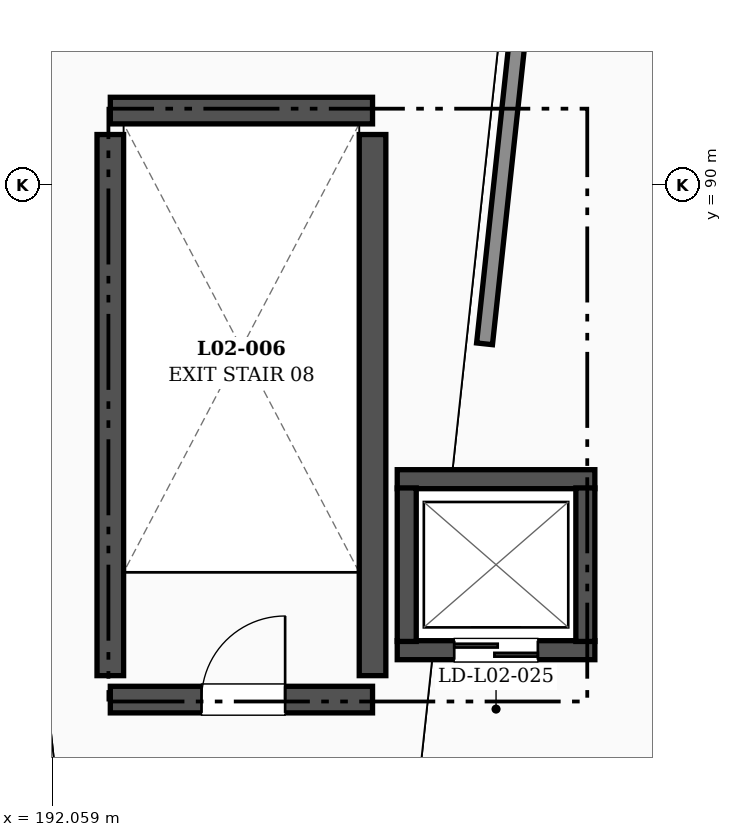
"""IFC4 building model, lengths in metres.
Left out: names, types, materials, properties, quantities, classifications, styles, units other than length and angle.
Written with IfcOpenShell. Run it as: python <this file> out.ifc"""

import sys

from ifc_helpers import new_model, si_unit, direction, frame, frame_2d, origin, place, context, subcontext, project, spatial, rectangle, extrude, element, fill, save


model = new_model("IFC4")
c1 = context("Model", 3, precision=1e-05, world=origin(), true_north=direction((0.0, 1.0)))
c2 = subcontext(c1, "Body", "Model", "MODEL_VIEW")
j1 = project(units=[si_unit("LENGTHUNIT", "METRE"), si_unit("PLANEANGLEUNIT", "RADIAN")], contexts=[c1])
p1 = place(None, origin())
s1 = spatial("IfcSite", under=j1, at=p1, CompositionType="ELEMENT")
p2 = place(p1, origin())
s2 = spatial("IfcBuilding", under=s1, at=p2, CompositionType="ELEMENT")
p3 = place(p2, frame((0.0, 0.0, 10.8)))
s3 = spatial("IfcBuildingStorey", under=s2, at=p3, CompositionType="ELEMENT", Elevation=10.8)
p4 = place(p3, frame((205.371, 90.653, 0.0), z_axis=(0.0, 0.0, 1.0), x_axis=(-0.794325535109, 0.607492340918, 0.0)))
e1 = element("IfcWall", 1, at=p4, inside=s3, PredefinedType="SOLIDWALL", context=c2, shape_type="SweptSolid", body=[
    extrude(rectangle(XDim=8.583, YDim=0.26, at=frame_2d((4.291, 0.0))), origin(), (0.0, 0.0, 1.0), 3.23),
])
p5 = place(p4, frame((3.441, 0.0, 0.95)))
e2 = element("IfcOpeningElement", 2, at=p5, cuts=e1, PredefinedType="OPENING", context=c2, shape_type="SweptSolid", body=[
    extrude(rectangle(XDim=1.7, YDim=1.6, at=frame_2d((0.85, 0.8))), frame((0.0, 0.14, 0.0), z_axis=(0.0, -1.0, 0.0), x_axis=(1.0, 0.0, 0.0)), (0.0, 0.0, 1.0), 0.28),
])
p6 = place(p3, frame((192.825, 83.225, 0.0), z_axis=(0.0, 0.0, 1.0), x_axis=(1.0, 0.0, 0.0)))
e3 = element("IfcWall", 3, at=p6, inside=s3, PredefinedType="SHEAR", context=c2, shape_type="SweptSolid", body=[
    extrude(rectangle(XDim=3.45, YDim=0.35, at=frame_2d((1.725, 0.0))), origin(), (0.0, 0.0, 1.0), 3.98),
])
p7 = place(p6, frame((1.2, 0.0, 0.0)))
e4 = element("IfcOpeningElement", 4, at=p7, cuts=e3, PredefinedType="OPENING", context=c2, shape_type="SweptSolid", body=[
    extrude(rectangle(XDim=1.1, YDim=2.2, at=frame_2d((0.55, 1.1))), frame((0.0, 0.185, 0.0), z_axis=(0.0, -1.0, 0.0), x_axis=(1.0, 0.0, 0.0)), (0.0, 0.0, 1.0), 0.37),
])
p8 = place(p3, frame((192.825, 90.975, 0.0), z_axis=(0.0, 0.0, 1.0), x_axis=(1.0, 0.0, 0.0)))
e5 = element("IfcWall", 5, at=p8, inside=s3, PredefinedType="SHEAR", context=c2, shape_type="SweptSolid", body=[
    extrude(rectangle(XDim=3.45, YDim=0.35, at=frame_2d((1.725, 0.0))), origin(), (0.0, 0.0, 1.0), 3.98),
])
for number, where, z_axis, x_axis in (
    (6, (192.825, 83.54, 0.0), (0.0, 0.0, 1.0), (0.0, 1.0, 0.0)),
    (7, (196.275, 83.54, 0.0), (0.0, 0.0, 1.0), (0.0, 1.0, 0.0)),
):
    element("IfcWall", number, at=place(p3, frame(where, z_axis=z_axis, x_axis=x_axis)), inside=s3, PredefinedType="SHEAR", context=c2, shape_type="SweptSolid", body=[
        extrude(rectangle(XDim=7.12, YDim=0.35, at=frame_2d((3.56, 0.0))), origin(), (0.0, 0.0, 1.0), 3.98),
    ])
p9 = place(p3, frame((196.6, 83.875, 0.0), z_axis=(0.0, 0.0, 1.0), x_axis=(1.0, 0.0, 0.0)))
e8 = element("IfcWall", 8, at=p9, inside=s3, PredefinedType="SHEAR", context=c2, shape_type="SweptSolid", body=[
    extrude(rectangle(XDim=2.6, YDim=0.25, at=frame_2d((1.3, 0.0))), origin(), (0.0, 0.0, 1.0), 3.98),
])
p10 = place(p9, frame((0.75, 0.0, 0.0)))
e9 = element("IfcOpeningElement", 9, at=p10, cuts=e8, PredefinedType="OPENING", context=c2, shape_type="SweptSolid", body=[
    extrude(rectangle(XDim=1.1, YDim=2.2, at=frame_2d((0.55, 1.1))), frame((0.0, 0.135, 0.0), z_axis=(0.0, -1.0, 0.0), x_axis=(1.0, 0.0, 0.0)), (0.0, 0.0, 1.0), 0.27),
])
p11 = place(p3, frame((196.6, 86.125, 0.0), z_axis=(0.0, 0.0, 1.0), x_axis=(1.0, 0.0, 0.0)))
e10 = element("IfcWall", 10, at=p11, inside=s3, PredefinedType="SHEAR", context=c2, shape_type="SweptSolid", body=[
    extrude(rectangle(XDim=2.6, YDim=0.25, at=frame_2d((1.3, 0.0))), origin(), (0.0, 0.0, 1.0), 3.98),
])
for number, where, z_axis, x_axis in (
    (11, (196.725, 83.99, 0.0), (0.0, 0.0, 1.0), (0.0, 1.0, 0.0)),
    (12, (199.075, 83.99, 0.0), (0.0, 0.0, 1.0), (0.0, 1.0, 0.0)),
):
    element("IfcWall", number, at=place(p3, frame(where, z_axis=z_axis, x_axis=x_axis)), inside=s3, PredefinedType="SHEAR", context=c2, shape_type="SweptSolid", body=[
        extrude(rectangle(XDim=2.02, YDim=0.25, at=frame_2d((1.01, 0.0))), origin(), (0.0, 0.0, 1.0), 3.98),
    ])
p12 = place(p3, frame((197.749, 87.906, 0.0), z_axis=(0.0, 0.0, 1.0), x_axis=(0.107124111103, 0.994245656174, 0.0)))
e13 = element("IfcWall", 13, at=p12, inside=s3, PredefinedType="PARTITIONING", context=c2, shape_type="SweptSolid", body=[
    extrude(rectangle(XDim=6.053, YDim=0.21, at=frame_2d((3.027, 0.0))), origin(), (0.0, 0.0, 1.0), 3.18),
])
p13 = place(p7, origin())
e14 = element("IfcDoor", 14, at=p13, inside=s3, OperationType="SINGLE_SWING_RIGHT", PredefinedType="DOOR", context=c2, shape_type="SweptSolid", body=[
    extrude(rectangle(XDim=1.1, YDim=2.2, at=frame_2d((0.55, 1.1))), frame((0.0, 0.025, 0.0), z_axis=(0.0, -1.0, 0.0), x_axis=(1.0, 0.0, 0.0)), (0.0, 0.0, 1.0), 0.05),
])
fill(e4, e14)
p14 = place(p10, origin())
e15 = element("IfcDoor", 15, at=p14, inside=s3, OperationType="DOUBLE_DOOR_SLIDING", PredefinedType="DOOR", context=c2, shape_type="SweptSolid", body=[
    extrude(rectangle(XDim=1.1, YDim=2.2, at=frame_2d((0.55, 1.1))), frame((0.0, 0.025, 0.0), z_axis=(0.0, -1.0, 0.0), x_axis=(1.0, 0.0, 0.0)), (0.0, 0.0, 1.0), 0.05),
])
fill(e9, e15)
save(model, sys.argv[1])
